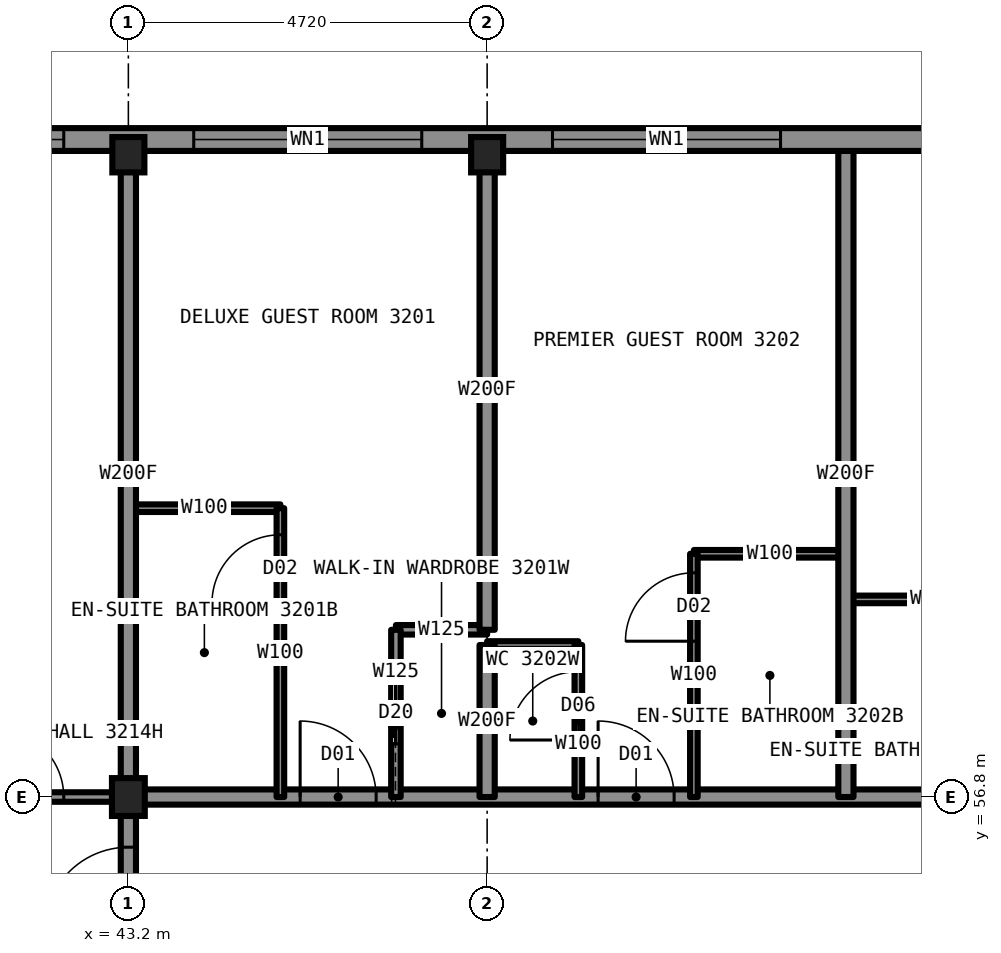
"""IFC4 building model, lengths in metres.
Left out: names, types, materials, properties, quantities, classifications, styles, units other than length and angle.
Written with IfcOpenShell. Run it as: python <this file> out.ifc"""

import sys

from ifc_helpers import new_model, si_unit, direction, frame, frame_2d, origin, origin_2d, place, context, subcontext, project, spatial, rectangle, i_section, extrude, element, fill, save


model = new_model("IFC4")
c1 = context("Model", 3, precision=1e-05, world=origin(), true_north=direction((0.0, 1.0)))
c2 = subcontext(c1, "Body", "Model", "MODEL_VIEW")
j1 = project(units=[si_unit("LENGTHUNIT", "METRE"), si_unit("PLANEANGLEUNIT", "RADIAN")], contexts=[c1])
p1 = place(None, origin())
s1 = spatial("IfcSite", under=j1, at=p1, CompositionType="ELEMENT")
p2 = place(p1, origin())
s2 = spatial("IfcBuilding", under=s1, at=p2, CompositionType="ELEMENT")
p3 = place(p2, frame((0.0, 0.0, 114.4)))
s3 = spatial("IfcBuildingStorey", under=s2, at=p3, CompositionType="ELEMENT", Elevation=114.4)
for number, where, z_axis, x_axis in (
    (1, (43.2, 65.25, 0.0), (0.0, 0.0, 1.0), (1.0, 0.0, 0.0)),
    (2, (47.92, 65.25, 0.0), (0.0, 0.0, 1.0), (1.0, 0.0, 0.0)),
):
    element("IfcColumn", number, at=place(p3, frame(where, z_axis=z_axis, x_axis=x_axis)), inside=s3, PredefinedType="COLUMN", context=c2, shape_type="SweptSolid", body=[
        extrude(i_section(OverallWidth=0.422, OverallDepth=0.465, WebThickness=0.045, FlangeThickness=0.073, at=origin_2d()), origin(), (0.0, 0.0, 1.0), 3.5),
    ])
p4 = place(p3, frame((43.2, 56.8, 0.0), z_axis=(0.0, 0.0, 1.0), x_axis=(1.0, 0.0, 0.0)))
e3 = element("IfcColumn", 3, at=p4, inside=s3, PredefinedType="COLUMN", context=c2, shape_type="SweptSolid", body=[
    extrude(i_section(OverallWidth=0.432, OverallDepth=0.498, WebThickness=0.056, FlangeThickness=0.089, at=origin_2d()), origin(), (0.0, 0.0, 1.0), 3.5),
])
p5 = place(p3, frame((43.2, 56.8, 0.0), z_axis=(0.0, 0.0, 1.0), x_axis=(1.0, 0.0, 0.0)))
e4 = element("IfcWall", 4, at=p5, inside=s3, PredefinedType="PARTITIONING", context=c2, shape_type="SweptSolid", body=[
    extrude(rectangle(XDim=23.6, YDim=0.2, at=frame_2d((11.8, 0.0))), origin(), (0.0, 0.0, 1.0), 3.33),
])
p6 = place(p5, frame((2.26, 0.0, 0.0)))
e5 = element("IfcOpeningElement", 5, at=p6, cuts=e4, PredefinedType="OPENING", context=c2, shape_type="SweptSolid", body=[
    extrude(rectangle(XDim=1.0, YDim=2.2, at=frame_2d((0.5, 1.1))), frame((0.0, 0.11, 0.0), z_axis=(0.0, -1.0, 0.0), x_axis=(1.0, 0.0, 0.0)), (0.0, 0.0, 1.0), 0.22),
])
p7 = place(p5, frame((6.18, 0.0, 0.0)))
e6 = element("IfcOpeningElement", 6, at=p7, cuts=e4, PredefinedType="OPENING", context=c2, shape_type="SweptSolid", body=[
    extrude(rectangle(XDim=1.0, YDim=2.2, at=frame_2d((0.5, 1.1))), frame((0.0, 0.11, 0.0), z_axis=(0.0, -1.0, 0.0), x_axis=(1.0, 0.0, 0.0)), (0.0, 0.0, 1.0), 0.22),
])
p8 = place(p5, frame((11.99, 0.0, 0.0)))
e7 = element("IfcOpeningElement", 7, at=p8, cuts=e4, PredefinedType="OPENING", context=c2, shape_type="SweptSolid", body=[
    extrude(rectangle(XDim=1.0, YDim=2.2, at=frame_2d((0.5, 1.1))), frame((0.0, 0.11, 0.0), z_axis=(0.0, -1.0, 0.0), x_axis=(1.0, 0.0, 0.0)), (0.0, 0.0, 1.0), 0.22),
])
p9 = place(p5, frame((17.16, 0.0, 0.0)))
e8 = element("IfcOpeningElement", 8, at=p9, cuts=e4, PredefinedType="OPENING", context=c2, shape_type="SweptSolid", body=[
    extrude(rectangle(XDim=1.0, YDim=2.2, at=frame_2d((0.5, 1.1))), frame((0.0, 0.11, 0.0), z_axis=(0.0, -1.0, 0.0), x_axis=(1.0, 0.0, 0.0)), (0.0, 0.0, 1.0), 0.22),
])
p10 = place(p3, frame((34.7, 56.8, 0.0), z_axis=(0.0, 0.0, 1.0), x_axis=(1.0, 0.0, 0.0)))
e9 = element("IfcWall", 9, at=p10, inside=s3, PredefinedType="PARTITIONING", context=c2, shape_type="SweptSolid", body=[
    extrude(rectangle(XDim=8.5, YDim=0.125, at=frame_2d((4.25, 0.0))), origin(), (0.0, 0.0, 1.0), 2.573),
])
p11 = place(p10, frame((6.75, 0.0, 0.0)))
e10 = element("IfcOpeningElement", 10, at=p11, cuts=e9, PredefinedType="OPENING", context=c2, shape_type="SweptSolid", body=[
    extrude(rectangle(XDim=0.9, YDim=2.2, at=frame_2d((0.45, 1.1))), frame((0.0, 0.073, 0.0), z_axis=(0.0, -1.0, 0.0), x_axis=(1.0, 0.0, 0.0)), (0.0, 0.0, 1.0), 0.145),
])
p12 = place(p3, frame((47.92, 58.8, 0.0), z_axis=(0.0, 0.0, 1.0), x_axis=(1.0, 0.0, 0.0)))
e11 = element("IfcWall", 11, at=p12, inside=s3, PredefinedType="PARTITIONING", context=c2, shape_type="SweptSolid", body=[
    extrude(rectangle(XDim=1.2, YDim=0.1, at=frame_2d((0.6, 0.0))), origin(), (0.0, 0.0, 1.0), 3.33),
])
p13 = place(p3, frame((46.72, 59.0, 0.0), z_axis=(0.0, 0.0, 1.0), x_axis=(1.0, 0.0, 0.0)))
e12 = element("IfcWall", 12, at=p13, inside=s3, PredefinedType="PARTITIONING", context=c2, shape_type="SweptSolid", body=[
    extrude(rectangle(XDim=1.2, YDim=0.125, at=frame_2d((0.6, 0.0))), origin(), (0.0, 0.0, 1.0), 3.33),
])
p14 = place(p3, frame((52.64, 59.4, 0.0), z_axis=(0.0, 0.0, 1.0), x_axis=(1.0, 0.0, 0.0)))
e13 = element("IfcWall", 13, at=p14, inside=s3, PredefinedType="PARTITIONING", context=c2, shape_type="SweptSolid", body=[
    extrude(rectangle(XDim=2.3, YDim=0.1, at=frame_2d((1.15, 0.0))), origin(), (0.0, 0.0, 1.0), 3.33),
])
p15 = place(p3, frame((50.64, 60.0, 0.0), z_axis=(0.0, 0.0, 1.0), x_axis=(1.0, 0.0, 0.0)))
e14 = element("IfcWall", 14, at=p15, inside=s3, PredefinedType="PARTITIONING", context=c2, shape_type="SweptSolid", body=[
    extrude(rectangle(XDim=2.0, YDim=0.1, at=frame_2d((1.0, 0.0))), origin(), (0.0, 0.0, 1.0), 2.731),
])
p16 = place(p3, frame((43.2, 60.6, 0.0), z_axis=(0.0, 0.0, 1.0), x_axis=(1.0, 0.0, 0.0)))
e15 = element("IfcWall", 15, at=p16, inside=s3, PredefinedType="PARTITIONING", context=c2, shape_type="SweptSolid", body=[
    extrude(rectangle(XDim=2.0, YDim=0.1, at=frame_2d((1.0, 0.0))), origin(), (0.0, 0.0, 1.0), 3.33),
])
p17 = place(p3, frame((43.2, 52.08, 0.0), z_axis=(0.0, 0.0, 1.0), x_axis=(0.0, 1.0, 0.0)))
e16 = element("IfcWall", 16, at=p17, inside=s3, PredefinedType="PARTITIONING", context=c2, shape_type="SweptSolid", body=[
    extrude(rectangle(XDim=4.72, YDim=0.2, at=frame_2d((2.36, 0.0))), origin(), (0.0, 0.0, 1.0), 3.33),
])
p18 = place(p17, frame((2.96, 0.0, 0.0)))
e17 = element("IfcOpeningElement", 17, at=p18, cuts=e16, PredefinedType="OPENING", context=c2, shape_type="SweptSolid", body=[
    extrude(rectangle(XDim=1.1, YDim=2.2, at=frame_2d((0.55, 1.1))), frame((0.0, 0.11, 0.0), z_axis=(0.0, -1.0, 0.0), x_axis=(1.0, 0.0, 0.0)), (0.0, 0.0, 1.0), 0.22),
])
p19 = place(p3, frame((43.2, 56.8, 0.0), z_axis=(0.0, 0.0, 1.0), x_axis=(0.0, 1.0, 0.0)))
e18 = element("IfcWall", 18, at=p19, inside=s3, PredefinedType="PARTITIONING", context=c2, shape_type="SweptSolid", body=[
    extrude(rectangle(XDim=8.5, YDim=0.2, at=frame_2d((4.25, 0.0))), origin(), (0.0, 0.0, 1.0), 2.573),
])
p20 = place(p3, frame((52.64, 56.8, 0.0), z_axis=(0.0, 0.0, 1.0), x_axis=(0.0, 1.0, 0.0)))
e19 = element("IfcWall", 19, at=p20, inside=s3, PredefinedType="PARTITIONING", context=c2, shape_type="SweptSolid", body=[
    extrude(rectangle(XDim=8.5, YDim=0.2, at=frame_2d((4.25, 0.0))), origin(), (0.0, 0.0, 1.0), 3.33),
])
p21 = place(p3, frame((50.64, 56.8, 0.0), z_axis=(0.0, 0.0, 1.0), x_axis=(0.0, 1.0, 0.0)))
e20 = element("IfcWall", 20, at=p21, inside=s3, PredefinedType="PARTITIONING", context=c2, shape_type="SweptSolid", body=[
    extrude(rectangle(XDim=3.2, YDim=0.1, at=frame_2d((1.6, 0.0))), origin(), (0.0, 0.0, 1.0), 3.33),
])
p22 = place(p21, frame((2.05, 0.0, 0.0)))
e21 = element("IfcOpeningElement", 21, at=p22, cuts=e20, PredefinedType="OPENING", context=c2, shape_type="SweptSolid", body=[
    extrude(rectangle(XDim=0.9, YDim=2.1, at=frame_2d((0.45, 1.05))), frame((0.0, 0.06, 0.0), z_axis=(0.0, -1.0, 0.0), x_axis=(1.0, 0.0, 0.0)), (0.0, 0.0, 1.0), 0.12),
])
p23 = place(p3, frame((49.12, 56.8, 0.0), z_axis=(0.0, 0.0, 1.0), x_axis=(0.0, 1.0, 0.0)))
e22 = element("IfcWall", 22, at=p23, inside=s3, PredefinedType="PARTITIONING", context=c2, shape_type="SweptSolid", body=[
    extrude(rectangle(XDim=2.0, YDim=0.1, at=frame_2d((1.0, 0.0))), origin(), (0.0, 0.0, 1.0), 3.33),
])
p24 = place(p23, frame((0.75, 0.0, 0.0)))
e23 = element("IfcOpeningElement", 23, at=p24, cuts=e22, PredefinedType="OPENING", context=c2, shape_type="SweptSolid", body=[
    extrude(rectangle(XDim=0.9, YDim=2.1, at=frame_2d((0.45, 1.05))), frame((0.0, 0.06, 0.0), z_axis=(0.0, -1.0, 0.0), x_axis=(1.0, 0.0, 0.0)), (0.0, 0.0, 1.0), 0.12),
])
p25 = place(p3, frame((47.92, 56.8, 0.0), z_axis=(0.0, 0.0, 1.0), x_axis=(0.0, 1.0, 0.0)))
e24 = element("IfcWall", 24, at=p25, inside=s3, PredefinedType="PARTITIONING", context=c2, shape_type="SweptSolid", body=[
    extrude(rectangle(XDim=2.0, YDim=0.2, at=frame_2d((1.0, 0.0))), origin(), (0.0, 0.0, 1.0), 2.573),
])
p26 = place(p3, frame((47.92, 59.0, 0.0), z_axis=(0.0, 0.0, 1.0), x_axis=(0.0, 1.0, 0.0)))
e25 = element("IfcWall", 25, at=p26, inside=s3, PredefinedType="PARTITIONING", context=c2, shape_type="SweptSolid", body=[
    extrude(rectangle(XDim=6.3, YDim=0.2, at=frame_2d((3.15, 0.0))), origin(), (0.0, 0.0, 1.0), 2.573),
])
p27 = place(p3, frame((46.72, 56.8, 0.0), z_axis=(0.0, 0.0, 1.0), x_axis=(0.0, 1.0, 0.0)))
e26 = element("IfcWall", 26, at=p27, inside=s3, PredefinedType="PARTITIONING", context=c2, shape_type="SweptSolid", body=[
    extrude(rectangle(XDim=2.2, YDim=0.125, at=frame_2d((1.1, 0.0))), origin(), (0.0, 0.0, 1.0), 3.33),
])
p28 = place(p27, frame((0.7, 0.0, 0.0)))
e27 = element("IfcOpeningElement", 27, at=p28, cuts=e26, PredefinedType="OPENING", context=c2, shape_type="SweptSolid", body=[
    extrude(rectangle(XDim=0.8, YDim=2.1, at=frame_2d((0.4, 1.05))), frame((0.0, 0.073, 0.0), z_axis=(0.0, -1.0, 0.0), x_axis=(1.0, 0.0, 0.0)), (0.0, 0.0, 1.0), 0.145),
])
p29 = place(p3, frame((45.2, 56.8, 0.0), z_axis=(0.0, 0.0, 1.0), x_axis=(0.0, 1.0, 0.0)))
e28 = element("IfcWall", 28, at=p29, inside=s3, PredefinedType="PARTITIONING", context=c2, shape_type="SweptSolid", body=[
    extrude(rectangle(XDim=3.8, YDim=0.1, at=frame_2d((1.9, 0.0))), origin(), (0.0, 0.0, 1.0), 3.33),
])
p30 = place(p29, frame((2.55, 0.0, 0.0)))
e29 = element("IfcOpeningElement", 29, at=p30, cuts=e28, PredefinedType="OPENING", context=c2, shape_type="SweptSolid", body=[
    extrude(rectangle(XDim=0.9, YDim=2.1, at=frame_2d((0.45, 1.05))), frame((0.0, 0.06, 0.0), z_axis=(0.0, -1.0, 0.0), x_axis=(1.0, 0.0, 0.0)), (0.0, 0.0, 1.0), 0.12),
])
p31 = place(p3, frame((70.1, 65.45, 0.0), z_axis=(0.0, 0.0, 1.0), x_axis=(-1.0, 0.0, 0.0)))
e30 = element("IfcWall", 30, at=p31, inside=s3, PredefinedType="SOLIDWALL", context=c2, shape_type="SweptSolid", body=[
    extrude(rectangle(XDim=30.2, YDim=0.3, at=frame_2d((15.1, 0.0))), origin(), (0.0, 0.0, 1.0), 2.83),
])
p32 = place(p31, frame((0.85, 0.0, 0.5)))
e31 = element("IfcOpeningElement", 31, at=p32, cuts=e30, PredefinedType="OPENING", context=c2, shape_type="SweptSolid", body=[
    extrude(rectangle(XDim=1.6, YDim=2.0, at=frame_2d((0.8, 1.0))), frame((0.0, 0.16, 0.0), z_axis=(0.0, -1.0, 0.0), x_axis=(1.0, 0.0, 0.0)), (0.0, 0.0, 1.0), 0.32),
])
p33 = place(p31, frame((4.16, 0.0, 0.5)))
e32 = element("IfcOpeningElement", 32, at=p33, cuts=e30, PredefinedType="OPENING", context=c2, shape_type="SweptSolid", body=[
    extrude(rectangle(XDim=3.0, YDim=2.0, at=frame_2d((1.5, 1.0))), frame((0.0, 0.16, 0.0), z_axis=(0.0, -1.0, 0.0), x_axis=(1.0, 0.0, 0.0)), (0.0, 0.0, 1.0), 0.32),
])
p34 = place(p31, frame((10.53, 0.0, 0.5)))
e33 = element("IfcOpeningElement", 33, at=p34, cuts=e30, PredefinedType="OPENING", context=c2, shape_type="SweptSolid", body=[
    extrude(rectangle(XDim=1.3, YDim=1.9, at=frame_2d((0.65, 0.95))), frame((0.0, 0.16, 0.0), z_axis=(0.0, -1.0, 0.0), x_axis=(1.0, 0.0, 0.0)), (0.0, 0.0, 1.0), 0.32),
])
p35 = place(p31, frame((13.6, 0.0, 0.5)))
e34 = element("IfcOpeningElement", 34, at=p35, cuts=e30, PredefinedType="OPENING", context=c2, shape_type="SweptSolid", body=[
    extrude(rectangle(XDim=3.0, YDim=2.0, at=frame_2d((1.5, 1.0))), frame((0.0, 0.16, 0.0), z_axis=(0.0, -1.0, 0.0), x_axis=(1.0, 0.0, 0.0)), (0.0, 0.0, 1.0), 0.32),
])
p36 = place(p31, frame((18.32, 0.0, 0.5)))
e35 = element("IfcOpeningElement", 35, at=p36, cuts=e30, PredefinedType="OPENING", context=c2, shape_type="SweptSolid", body=[
    extrude(rectangle(XDim=1.3, YDim=1.9, at=frame_2d((0.65, 0.95))), frame((0.0, 0.16, 0.0), z_axis=(0.0, -1.0, 0.0), x_axis=(1.0, 0.0, 0.0)), (0.0, 0.0, 1.0), 0.32),
])
p37 = place(p31, frame((23.04, 0.0, 0.5)))
e36 = element("IfcOpeningElement", 36, at=p37, cuts=e30, PredefinedType="OPENING", context=c2, shape_type="SweptSolid", body=[
    extrude(rectangle(XDim=3.0, YDim=2.0, at=frame_2d((1.5, 1.0))), frame((0.0, 0.16, 0.0), z_axis=(0.0, -1.0, 0.0), x_axis=(1.0, 0.0, 0.0)), (0.0, 0.0, 1.0), 0.32),
])
p38 = place(p31, frame((27.75, 0.0, 0.5)))
e37 = element("IfcOpeningElement", 37, at=p38, cuts=e30, PredefinedType="OPENING", context=c2, shape_type="SweptSolid", body=[
    extrude(rectangle(XDim=1.6, YDim=2.0, at=frame_2d((0.8, 1.0))), frame((0.0, 0.16, 0.0), z_axis=(0.0, -1.0, 0.0), x_axis=(1.0, 0.0, 0.0)), (0.0, 0.0, 1.0), 0.32),
])
p39 = place(p31, frame((9.88, 0.0, 0.5)))
e38 = element("IfcOpeningElement", 38, at=p39, cuts=e30, PredefinedType="OPENING", context=c2, shape_type="SweptSolid", body=[
    extrude(rectangle(XDim=0.6, YDim=0.9, at=frame_2d((0.3, 0.45))), frame((0.0, 0.16, 0.0), z_axis=(0.0, -1.0, 0.0), x_axis=(1.0, 0.0, 0.0)), (0.0, 0.0, 1.0), 0.32),
])
p40 = place(p31, frame((19.67, 0.0, 0.5)))
e39 = element("IfcOpeningElement", 39, at=p40, cuts=e30, PredefinedType="OPENING", context=c2, shape_type="SweptSolid", body=[
    extrude(rectangle(XDim=0.6, YDim=0.9, at=frame_2d((0.3, 0.45))), frame((0.0, 0.16, 0.0), z_axis=(0.0, -1.0, 0.0), x_axis=(1.0, 0.0, 0.0)), (0.0, 0.0, 1.0), 0.32),
])
p41 = place(p6, origin())
e40 = element("IfcDoor", 40, at=p41, inside=s3, OperationType="SINGLE_SWING_LEFT", PredefinedType="DOOR", context=c2, shape_type="SweptSolid", body=[
    extrude(rectangle(XDim=1.0, YDim=2.2, at=frame_2d((0.5, 1.1))), frame((0.0, 0.025, 0.0), z_axis=(0.0, -1.0, 0.0), x_axis=(1.0, 0.0, 0.0)), (0.0, 0.0, 1.0), 0.05),
])
fill(e5, e40)
p42 = place(p30, origin())
e41 = element("IfcDoor", 41, at=p42, inside=s3, OperationType="SINGLE_SWING_RIGHT", PredefinedType="DOOR", context=c2, shape_type="SweptSolid", body=[
    extrude(rectangle(XDim=0.9, YDim=2.1, at=frame_2d((0.45, 1.05))), frame((0.0, 0.025, 0.0), z_axis=(0.0, -1.0, 0.0), x_axis=(1.0, 0.0, 0.0)), (0.0, 0.0, 1.0), 0.05),
])
fill(e29, e41)
p43 = place(p28, origin())
e42 = element("IfcDoor", 42, at=p43, inside=s3, OperationType="SLIDING_TO_LEFT", PredefinedType="DOOR", context=c2, shape_type="SweptSolid", body=[
    extrude(rectangle(XDim=0.8, YDim=2.1, at=frame_2d((0.4, 1.05))), frame((0.0, 0.025, 0.0), z_axis=(0.0, -1.0, 0.0), x_axis=(1.0, 0.0, 0.0)), (0.0, 0.0, 1.0), 0.05),
])
fill(e27, e42)
p44 = place(p7, origin())
e43 = element("IfcDoor", 43, at=p44, inside=s3, OperationType="SINGLE_SWING_LEFT", PredefinedType="DOOR", context=c2, shape_type="SweptSolid", body=[
    extrude(rectangle(XDim=1.0, YDim=2.2, at=frame_2d((0.5, 1.1))), frame((0.0, 0.025, 0.0), z_axis=(0.0, -1.0, 0.0), x_axis=(1.0, 0.0, 0.0)), (0.0, 0.0, 1.0), 0.05),
])
fill(e6, e43)
p45 = place(p22, origin())
e44 = element("IfcDoor", 44, at=p45, inside=s3, OperationType="SINGLE_SWING_RIGHT", PredefinedType="DOOR", context=c2, shape_type="SweptSolid", body=[
    extrude(rectangle(XDim=0.9, YDim=2.1, at=frame_2d((0.45, 1.05))), frame((0.0, 0.025, 0.0), z_axis=(0.0, -1.0, 0.0), x_axis=(1.0, 0.0, 0.0)), (0.0, 0.0, 1.0), 0.05),
])
fill(e21, e44)
p46 = place(p24, origin())
e45 = element("IfcDoor", 45, at=p46, inside=s3, OperationType="SINGLE_SWING_LEFT", PredefinedType="DOOR", context=c2, shape_type="SweptSolid", body=[
    extrude(rectangle(XDim=0.9, YDim=2.1, at=frame_2d((0.45, 1.05))), frame((0.0, 0.025, 0.0), z_axis=(0.0, -1.0, 0.0), x_axis=(1.0, 0.0, 0.0)), (0.0, 0.0, 1.0), 0.05),
])
fill(e23, e45)
p47 = place(p11, origin())
e46 = element("IfcDoor", 46, at=p47, inside=s3, OperationType="SINGLE_SWING_LEFT", PredefinedType="DOOR", context=c2, shape_type="SweptSolid", body=[
    extrude(rectangle(XDim=0.9, YDim=2.2, at=frame_2d((0.45, 1.1))), frame((0.0, 0.025, 0.0), z_axis=(0.0, -1.0, 0.0), x_axis=(1.0, 0.0, 0.0)), (0.0, 0.0, 1.0), 0.05),
])
fill(e10, e46)
p48 = place(p18, origin())
e47 = element("IfcDoor", 47, at=p48, inside=s3, OperationType="SINGLE_SWING_LEFT", PredefinedType="DOOR", context=c2, shape_type="SweptSolid", body=[
    extrude(rectangle(XDim=1.1, YDim=2.2, at=frame_2d((0.55, 1.1))), frame((0.0, 0.025, 0.0), z_axis=(0.0, -1.0, 0.0), x_axis=(1.0, 0.0, 0.0)), (0.0, 0.0, 1.0), 0.05),
])
fill(e17, e47)
p49 = place(p35, origin())
e48 = element("IfcWindow", 48, at=p49, inside=s3, PartitioningType="SINGLE_PANEL", PredefinedType="WINDOW", context=c2, shape_type="SweptSolid", body=[
    extrude(rectangle(XDim=3.0, YDim=2.0, at=frame_2d((1.5, 1.0))), frame((0.0, 0.03, 0.0), z_axis=(0.0, -1.0, 0.0), x_axis=(1.0, 0.0, 0.0)), (0.0, 0.0, 1.0), 0.06),
])
fill(e34, e48)
p50 = place(p36, origin())
e49 = element("IfcWindow", 49, at=p50, inside=s3, PartitioningType="SINGLE_PANEL", PredefinedType="WINDOW", context=c2, shape_type="SweptSolid", body=[
    extrude(rectangle(XDim=1.3, YDim=1.9, at=frame_2d((0.65, 0.95))), frame((0.0, 0.03, 0.0), z_axis=(0.0, -1.0, 0.0), x_axis=(1.0, 0.0, 0.0)), (0.0, 0.0, 1.0), 0.06),
])
fill(e35, e49)
p51 = place(p37, origin())
e50 = element("IfcWindow", 50, at=p51, inside=s3, PartitioningType="SINGLE_PANEL", PredefinedType="WINDOW", context=c2, shape_type="SweptSolid", body=[
    extrude(rectangle(XDim=3.0, YDim=2.0, at=frame_2d((1.5, 1.0))), frame((0.0, 0.03, 0.0), z_axis=(0.0, -1.0, 0.0), x_axis=(1.0, 0.0, 0.0)), (0.0, 0.0, 1.0), 0.06),
])
fill(e36, e50)
p52 = place(p38, origin())
e51 = element("IfcWindow", 51, at=p52, inside=s3, PartitioningType="SINGLE_PANEL", PredefinedType="WINDOW", context=c2, shape_type="SweptSolid", body=[
    extrude(rectangle(XDim=1.6, YDim=2.0, at=frame_2d((0.8, 1.0))), frame((0.0, 0.03, 0.0), z_axis=(0.0, -1.0, 0.0), x_axis=(1.0, 0.0, 0.0)), (0.0, 0.0, 1.0), 0.06),
])
fill(e37, e51)
p53 = place(p40, origin())
e52 = element("IfcWindow", 52, at=p53, inside=s3, PartitioningType="SINGLE_PANEL", PredefinedType="WINDOW", context=c2, shape_type="SweptSolid", body=[
    extrude(rectangle(XDim=0.6, YDim=0.9, at=frame_2d((0.3, 0.45))), frame((0.0, 0.03, 0.0), z_axis=(0.0, -1.0, 0.0), x_axis=(1.0, 0.0, 0.0)), (0.0, 0.0, 1.0), 0.06),
])
fill(e39, e52)
save(model, sys.argv[1])
